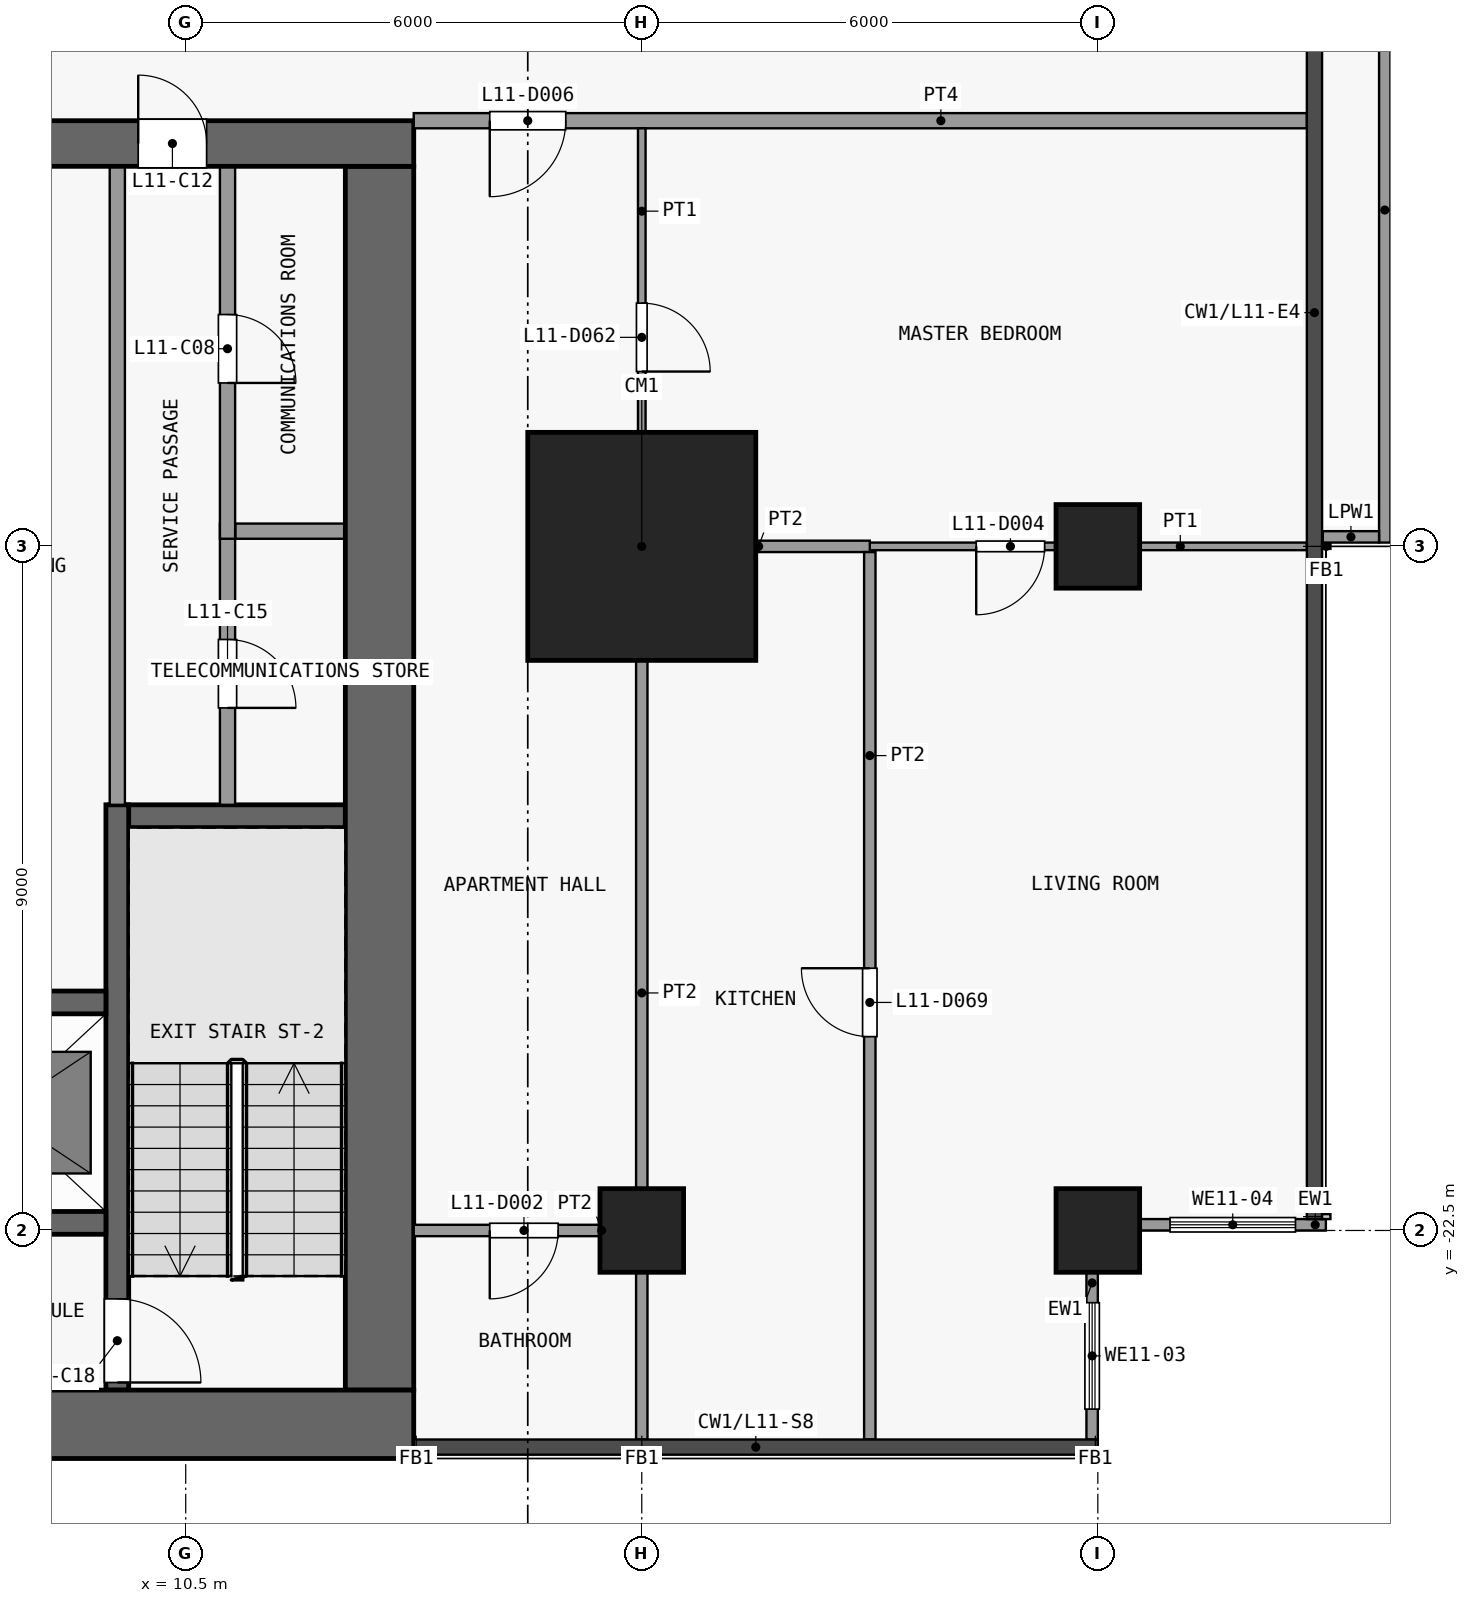
"""IFC4 building model, lengths in metres.
Left out: names, types, materials, properties, quantities, classifications, styles, units other than length and angle.
Written with IfcOpenShell. Run it as: python <this file> out.ifc"""

import sys

from ifc_helpers import new_model, si_unit, direction, frame, frame_2d, origin, origin_2d, place, context, subcontext, project, spatial, rectangle, extrude, element, fill, save


model = new_model("IFC4")
c1 = context("Model", 3, precision=1e-05, world=origin(), true_north=direction((0.0, 1.0)))
c2 = subcontext(c1, "Body", "Model", "MODEL_VIEW")
j1 = project(units=[si_unit("LENGTHUNIT", "METRE"), si_unit("PLANEANGLEUNIT", "RADIAN")], contexts=[c1])
p1 = place(None, origin())
s1 = spatial("IfcSite", under=j1, at=p1, CompositionType="ELEMENT")
p2 = place(p1, origin())
s2 = spatial("IfcBuilding", under=s1, at=p2, CompositionType="ELEMENT")
p3 = place(p2, frame((0.0, 0.0, 50.5)))
s3 = spatial("IfcBuildingStorey", under=s2, at=p3, CompositionType="ELEMENT", Elevation=50.5)
p4 = place(p3, frame((16.5, -22.5, 0.0), z_axis=(0.0, 0.0, 1.0), x_axis=(1.0, 0.0, 0.0)))
e1 = element("IfcColumn", 1, at=p4, inside=s3, PredefinedType="COLUMN", context=c2, shape_type="SweptSolid", body=[
    extrude(rectangle(XDim=1.1, YDim=1.1, at=origin_2d()), origin(), (0.0, 0.0, 1.0), 3.6),
])
p5 = place(p3, frame((16.5, -13.5, 0.0), z_axis=(0.0, 0.0, 1.0), x_axis=(1.0, 0.0, 0.0)))
e2 = element("IfcColumn", 2, at=p5, inside=s3, PredefinedType="COLUMN", context=c2, shape_type="SweptSolid", body=[
    extrude(rectangle(XDim=3.0, YDim=3.0, at=origin_2d()), origin(), (0.0, 0.0, 1.0), 3.6),
])
for number, where, z_axis, x_axis in (
    (3, (22.5, -22.5, 0.0), (0.0, 0.0, 1.0), (1.0, 0.0, 0.0)),
    (4, (22.5, -13.5, 0.0), (0.0, 0.0, 1.0), (1.0, 0.0, 0.0)),
):
    element("IfcColumn", number, at=place(p3, frame(where, z_axis=z_axis, x_axis=x_axis)), inside=s3, PredefinedType="COLUMN", context=c2, shape_type="SweptSolid", body=[
        extrude(rectangle(XDim=1.1, YDim=1.1, at=origin_2d()), origin(), (0.0, 0.0, 1.0), 3.6),
    ])
p6 = place(p3, frame((-13.5, -25.05, 0.0), z_axis=(0.0, 0.0, 1.0), x_axis=(1.0, 0.0, 0.0)))
e5 = element("IfcWall", 5, at=p6, inside=s3, PredefinedType="SHEAR", context=c2, shape_type="SweptSolid", body=[
    extrude(rectangle(XDim=27.0, YDim=0.9, at=frame_2d((13.5, 0.0))), origin(), (0.0, 0.0, 1.0), 3.3),
])
p7 = place(p3, frame((-13.5, -8.2, 0.0), z_axis=(0.0, 0.0, 1.0), x_axis=(1.0, 0.0, 0.0)))
e6 = element("IfcWall", 6, at=p7, inside=s3, PredefinedType="SHEAR", context=c2, shape_type="SweptSolid", body=[
    extrude(rectangle(XDim=27.0, YDim=0.6, at=frame_2d((13.5, 0.0))), origin(), (0.0, 0.0, 1.0), 3.3),
])
p8 = place(p7, frame((7.8, 0.0, 0.0)))
e7 = element("IfcOpeningElement", 7, at=p8, cuts=e6, PredefinedType="OPENING", context=c2, shape_type="SweptSolid", body=[
    extrude(rectangle(XDim=1.8, YDim=2.1, at=frame_2d((0.9, 1.05))), frame((0.0, 0.31, 0.0), z_axis=(0.0, -1.0, 0.0), x_axis=(1.0, 0.0, 0.0)), (0.0, 0.0, 1.0), 0.62),
])
p9 = place(p7, frame((17.4, 0.0, 0.0)))
e8 = element("IfcOpeningElement", 8, at=p9, cuts=e6, PredefinedType="OPENING", context=c2, shape_type="SweptSolid", body=[
    extrude(rectangle(XDim=1.8, YDim=2.1, at=frame_2d((0.9, 1.05))), frame((0.0, 0.31, 0.0), z_axis=(0.0, -1.0, 0.0), x_axis=(1.0, 0.0, 0.0)), (0.0, 0.0, 1.0), 0.62),
])
p10 = place(p7, frame((2.725, 0.0, 0.0)))
e9 = element("IfcOpeningElement", 9, at=p10, cuts=e6, PredefinedType="OPENING", context=c2, shape_type="SweptSolid", body=[
    extrude(rectangle(XDim=0.9, YDim=2.1, at=frame_2d((0.45, 1.05))), frame((0.0, 0.31, 0.0), z_axis=(0.0, -1.0, 0.0), x_axis=(1.0, 0.0, 0.0)), (0.0, 0.0, 1.0), 0.62),
])
p11 = place(p7, frame((23.375, 0.0, 0.0)))
e10 = element("IfcOpeningElement", 10, at=p11, cuts=e6, PredefinedType="OPENING", context=c2, shape_type="SweptSolid", body=[
    extrude(rectangle(XDim=0.9, YDim=2.1, at=frame_2d((0.45, 1.05))), frame((0.0, 0.31, 0.0), z_axis=(0.0, -1.0, 0.0), x_axis=(1.0, 0.0, 0.0)), (0.0, 0.0, 1.0), 0.62),
])
p12 = place(p3, frame((13.05, -24.6, 0.0), z_axis=(0.0, 0.0, 1.0), x_axis=(0.0, 1.0, 0.0)))
e11 = element("IfcWall", 11, at=p12, inside=s3, PredefinedType="SHEAR", context=c2, shape_type="SweptSolid", body=[
    extrude(rectangle(XDim=16.1, YDim=0.9, at=frame_2d((8.05, 0.0))), origin(), (0.0, 0.0, 1.0), 3.3),
])
p13 = place(p3, frame((6.35, -22.4, 0.0), z_axis=(0.0, 0.0, 1.0), x_axis=(1.0, 0.0, 0.0)))
e12 = element("IfcWall", 12, at=p13, inside=s3, PredefinedType="SHEAR", context=c2, shape_type="SweptSolid", body=[
    extrude(rectangle(XDim=3.1, YDim=0.3, at=frame_2d((1.55, 0.0))), origin(), (0.0, 0.0, 1.0), 3.3),
])
p14 = place(p3, frame((6.425, -19.5, 0.0), z_axis=(0.0, 0.0, 1.0), x_axis=(1.0, 0.0, 0.0)))
e13 = element("IfcWall", 13, at=p14, inside=s3, PredefinedType="SHEAR", context=c2, shape_type="SweptSolid", body=[
    extrude(rectangle(XDim=3.025, YDim=0.3, at=frame_2d((1.512, 0.0))), origin(), (0.0, 0.0, 1.0), 3.3),
])
p15 = place(p3, frame((9.5, -17.05, 0.0), z_axis=(0.0, 0.0, 1.0), x_axis=(1.0, 0.0, 0.0)))
e14 = element("IfcWall", 14, at=p15, inside=s3, PredefinedType="SHEAR", context=c2, shape_type="SweptSolid", body=[
    extrude(rectangle(XDim=3.1, YDim=0.3, at=frame_2d((1.55, 0.0))), origin(), (0.0, 0.0, 1.0), 3.3),
])
p16 = place(p3, frame((11.15, -13.3, 0.0), z_axis=(0.0, 0.0, 1.0), x_axis=(1.0, 0.0, 0.0)))
e15 = element("IfcWall", 15, at=p16, inside=s3, PredefinedType="PARTITIONING", context=c2, shape_type="SweptSolid", body=[
    extrude(rectangle(XDim=1.45, YDim=0.2, at=frame_2d((0.725, 0.0))), origin(), (0.0, 0.0, 1.0), 3.3),
])
p17 = place(p3, frame((9.6, -16.9, 0.0), z_axis=(0.0, 0.0, 1.0), x_axis=(0.0, -1.0, 0.0)))
e16 = element("IfcWall", 16, at=p17, inside=s3, PredefinedType="SHEAR", context=c2, shape_type="SweptSolid", body=[
    extrude(rectangle(XDim=7.7, YDim=0.3, at=frame_2d((3.85, 0.0))), origin(), (0.0, 0.0, 1.0), 3.3),
])
p18 = place(p17, frame((6.5, 0.0, 0.0)))
e17 = element("IfcOpeningElement", 17, at=p18, cuts=e16, PredefinedType="OPENING", context=c2, shape_type="SweptSolid", body=[
    extrude(rectangle(XDim=1.1, YDim=2.1, at=frame_2d((0.55, 1.05))), frame((0.0, 0.16, 0.0), z_axis=(0.0, -1.0, 0.0), x_axis=(1.0, 0.0, 0.0)), (0.0, 0.0, 1.0), 0.32),
])
p19 = place(p3, frame((9.6, -16.9, 0.0), z_axis=(0.0, 0.0, 1.0), x_axis=(0.0, 1.0, 0.0)))
e18 = element("IfcWall", 18, at=p19, inside=s3, PredefinedType="PARTITIONING", context=c2, shape_type="SweptSolid", body=[
    extrude(rectangle(XDim=8.4, YDim=0.2, at=frame_2d((4.2, 0.0))), origin(), (0.0, 0.0, 1.0), 3.3),
])
p20 = place(p3, frame((11.05, -13.2, 0.0), z_axis=(0.0, 0.0, 1.0), x_axis=(0.0, -1.0, 0.0)))
e19 = element("IfcWall", 19, at=p20, inside=s3, PredefinedType="PARTITIONING", context=c2, shape_type="SweptSolid", body=[
    extrude(rectangle(XDim=3.7, YDim=0.2, at=frame_2d((1.85, 0.0))), origin(), (0.0, 0.0, 1.0), 3.3),
])
p21 = place(p20, frame((1.525, 0.0, 0.0)))
e20 = element("IfcOpeningElement", 20, at=p21, cuts=e19, PredefinedType="OPENING", context=c2, shape_type="SweptSolid", body=[
    extrude(rectangle(XDim=0.9, YDim=2.1, at=frame_2d((0.45, 1.05))), frame((0.0, 0.11, 0.0), z_axis=(0.0, -1.0, 0.0), x_axis=(1.0, 0.0, 0.0)), (0.0, 0.0, 1.0), 0.22),
])
p22 = place(p3, frame((11.05, -8.5, 0.0), z_axis=(0.0, 0.0, 1.0), x_axis=(0.0, -1.0, 0.0)))
e21 = element("IfcWall", 21, at=p22, inside=s3, PredefinedType="PARTITIONING", context=c2, shape_type="SweptSolid", body=[
    extrude(rectangle(XDim=4.9, YDim=0.2, at=frame_2d((2.45, 0.0))), origin(), (0.0, 0.0, 1.0), 3.3),
])
p23 = place(p22, frame((1.95, 0.0, 0.0)))
e22 = element("IfcOpeningElement", 22, at=p23, cuts=e21, PredefinedType="OPENING", context=c2, shape_type="SweptSolid", body=[
    extrude(rectangle(XDim=0.9, YDim=2.1, at=frame_2d((0.45, 1.05))), frame((0.0, 0.11, 0.0), z_axis=(0.0, -1.0, 0.0), x_axis=(1.0, 0.0, 0.0)), (0.0, 0.0, 1.0), 0.22),
])
p24 = place(p3, frame((22.425, -23.05, 0.0), z_axis=(0.0, 0.0, 1.0), x_axis=(0.0, -1.0, 0.0)))
e23 = element("IfcWall", 23, at=p24, inside=s3, PredefinedType="SOLIDWALL", context=c2, shape_type="SweptSolid", body=[
    extrude(rectangle(XDim=2.2, YDim=0.15, at=frame_2d((1.1, 0.0))), origin(), (0.0, 0.0, 1.0), 3.3),
])
p25 = place(p24, frame((0.4, 0.0, 0.9)))
e24 = element("IfcOpeningElement", 24, at=p25, cuts=e23, PredefinedType="OPENING", context=c2, shape_type="SweptSolid", body=[
    extrude(rectangle(XDim=1.4, YDim=2.4, at=frame_2d((0.7, 1.2))), frame((0.0, 0.085, 0.0), z_axis=(0.0, -1.0, 0.0), x_axis=(1.0, 0.0, 0.0)), (0.0, 0.0, 1.0), 0.17),
])
p26 = place(p3, frame((25.5, -22.425, 0.0), z_axis=(0.0, 0.0, 1.0), x_axis=(-1.0, 0.0, 0.0)))
e25 = element("IfcWall", 25, at=p26, inside=s3, PredefinedType="SOLIDWALL", context=c2, shape_type="SweptSolid", body=[
    extrude(rectangle(XDim=2.45, YDim=0.15, at=frame_2d((1.225, 0.0))), origin(), (0.0, 0.0, 1.0), 3.3),
])
p27 = place(p26, frame((0.4, 0.0, 0.9)))
e26 = element("IfcOpeningElement", 26, at=p27, cuts=e25, PredefinedType="OPENING", context=c2, shape_type="SweptSolid", body=[
    extrude(rectangle(XDim=1.65, YDim=2.4, at=frame_2d((0.825, 1.2))), frame((0.0, 0.085, 0.0), z_axis=(0.0, -1.0, 0.0), x_axis=(1.0, 0.0, 0.0)), (0.0, 0.0, 1.0), 0.17),
])
p28 = place(p3, frame((26.275, -4.7, 0.0), z_axis=(0.0, 0.0, 1.0), x_axis=(0.0, -1.0, 0.0)))
e27 = element("IfcWall", 27, at=p28, inside=s3, PredefinedType="PARAPET", context=c2, shape_type="SweptSolid", body=[
    extrude(rectangle(XDim=8.75, YDim=0.15, at=frame_2d((4.375, 0.0))), origin(), (0.0, 0.0, 1.0), 1.15),
])
p29 = place(p3, frame((26.2, -13.375, 0.0), z_axis=(0.0, 0.0, 1.0), x_axis=(-1.0, 0.0, 0.0)))
e28 = element("IfcWall", 28, at=p29, inside=s3, PredefinedType="PARAPET", context=c2, shape_type="SweptSolid", body=[
    extrude(rectangle(XDim=0.74, YDim=0.15, at=frame_2d((0.37, 0.0))), origin(), (0.0, 0.0, 1.0), 1.15),
])
p30 = place(p3, frame((13.5, -22.5, 0.0), z_axis=(0.0, 0.0, 1.0), x_axis=(1.0, 0.0, 0.0)))
e29 = element("IfcWall", 29, at=p30, inside=s3, PredefinedType="PARTITIONING", context=c2, shape_type="SweptSolid", body=[
    extrude(rectangle(XDim=2.925, YDim=0.15, at=frame_2d((1.462, 0.0))), origin(), (0.0, 0.0, 1.0), 3.3),
])
p31 = place(p30, frame((1.0, 0.0, 0.0)))
e30 = element("IfcOpeningElement", 30, at=p31, cuts=e29, PredefinedType="OPENING", context=c2, shape_type="SweptSolid", body=[
    extrude(rectangle(XDim=0.9, YDim=2.1, at=frame_2d((0.45, 1.05))), frame((0.0, 0.085, 0.0), z_axis=(0.0, -1.0, 0.0), x_axis=(1.0, 0.0, 0.0)), (0.0, 0.0, 1.0), 0.17),
])
p32 = place(p3, frame((19.5, -13.5, 0.0), z_axis=(0.0, 0.0, 1.0), x_axis=(1.0, 0.0, 0.0)))
e31 = element("IfcWall", 31, at=p32, inside=s3, PredefinedType="PARTITIONING", context=c2, shape_type="SweptSolid", body=[
    extrude(rectangle(XDim=5.75, YDim=0.1, at=frame_2d((2.875, 0.0))), origin(), (0.0, 0.0, 1.0), 3.3),
])
p33 = place(p32, frame((1.4, 0.0, 0.0)))
e32 = element("IfcOpeningElement", 32, at=p33, cuts=e31, PredefinedType="OPENING", context=c2, shape_type="SweptSolid", body=[
    extrude(rectangle(XDim=0.9, YDim=2.1, at=frame_2d((0.45, 1.05))), frame((0.0, 0.06, 0.0), z_axis=(0.0, -1.0, 0.0), x_axis=(1.0, 0.0, 0.0)), (0.0, 0.0, 1.0), 0.12),
])
p34 = place(p3, frame((16.575, -13.5, 0.0), z_axis=(0.0, 0.0, 1.0), x_axis=(1.0, 0.0, 0.0)))
e33 = element("IfcWall", 33, at=p34, inside=s3, PredefinedType="PARTITIONING", context=c2, shape_type="SweptSolid", body=[
    extrude(rectangle(XDim=2.925, YDim=0.15, at=frame_2d((1.462, 0.0))), origin(), (0.0, 0.0, 1.0), 3.3),
])
p35 = place(p3, frame((13.5, -7.9, 0.0), z_axis=(0.0, 0.0, 1.0), x_axis=(1.0, 0.0, 0.0)))
e34 = element("IfcWall", 34, at=p35, inside=s3, PredefinedType="PARTITIONING", context=c2, shape_type="SweptSolid", body=[
    extrude(rectangle(XDim=11.75, YDim=0.2, at=frame_2d((5.875, 0.0))), origin(), (0.0, 0.0, 1.0), 3.3),
])
p36 = place(p35, frame((1.0, 0.0, 0.0)))
e35 = element("IfcOpeningElement", 35, at=p36, cuts=e34, PredefinedType="OPENING", context=c2, shape_type="SweptSolid", body=[
    extrude(rectangle(XDim=1.0, YDim=2.1, at=frame_2d((0.5, 1.05))), frame((0.0, 0.11, 0.0), z_axis=(0.0, -1.0, 0.0), x_axis=(1.0, 0.0, 0.0)), (0.0, 0.0, 1.0), 0.22),
])
p37 = place(p3, frame((16.5, -13.5, 0.0), z_axis=(0.0, 0.0, 1.0), x_axis=(0.0, 1.0, 0.0)))
e36 = element("IfcWall", 36, at=p37, inside=s3, PredefinedType="PARTITIONING", context=c2, shape_type="SweptSolid", body=[
    extrude(rectangle(XDim=5.5, YDim=0.1, at=frame_2d((2.75, 0.0))), origin(), (0.0, 0.0, 1.0), 3.3),
])
p38 = place(p37, frame((2.3, 0.0, 0.0)))
e37 = element("IfcOpeningElement", 37, at=p38, cuts=e36, PredefinedType="OPENING", context=c2, shape_type="SweptSolid", body=[
    extrude(rectangle(XDim=0.9, YDim=2.1, at=frame_2d((0.45, 1.05))), frame((0.0, 0.06, 0.0), z_axis=(0.0, -1.0, 0.0), x_axis=(1.0, 0.0, 0.0)), (0.0, 0.0, 1.0), 0.12),
])
p39 = place(p3, frame((16.5, -25.25, 0.0), z_axis=(0.0, 0.0, 1.0), x_axis=(0.0, 1.0, 0.0)))
e38 = element("IfcWall", 38, at=p39, inside=s3, PredefinedType="PARTITIONING", context=c2, shape_type="SweptSolid", body=[
    extrude(rectangle(XDim=11.75, YDim=0.15, at=frame_2d((5.875, 0.0))), origin(), (0.0, 0.0, 1.0), 3.3),
])
p40 = place(p3, frame((19.5, -25.25, 0.0), z_axis=(0.0, 0.0, 1.0), x_axis=(0.0, 1.0, 0.0)))
e39 = element("IfcWall", 39, at=p40, inside=s3, PredefinedType="PARTITIONING", context=c2, shape_type="SweptSolid", body=[
    extrude(rectangle(XDim=11.675, YDim=0.15, at=frame_2d((5.837, 0.0))), origin(), (0.0, 0.0, 1.0), 3.3),
])
p41 = place(p40, frame((5.3, 0.0, 0.0)))
e40 = element("IfcOpeningElement", 40, at=p41, cuts=e39, PredefinedType="OPENING", context=c2, shape_type="SweptSolid", body=[
    extrude(rectangle(XDim=0.9, YDim=2.1, at=frame_2d((0.45, 1.05))), frame((0.0, 0.085, 0.0), z_axis=(0.0, -1.0, 0.0), x_axis=(1.0, 0.0, 0.0)), (0.0, 0.0, 1.0), 0.17),
])
p42 = place(p23, origin())
e41 = element("IfcDoor", 41, at=p42, inside=s3, OperationType="SINGLE_SWING_RIGHT", PredefinedType="DOOR", context=c2, shape_type="SweptSolid", body=[
    extrude(rectangle(XDim=0.9, YDim=2.1, at=frame_2d((0.45, 1.05))), frame((0.0, 0.025, 0.0), z_axis=(0.0, -1.0, 0.0), x_axis=(1.0, 0.0, 0.0)), (0.0, 0.0, 1.0), 0.05),
])
fill(e22, e41)
p43 = place(p11, origin())
e42 = element("IfcDoor", 42, at=p43, inside=s3, OperationType="SINGLE_SWING_LEFT", PredefinedType="DOOR", context=c2, shape_type="SweptSolid", body=[
    extrude(rectangle(XDim=0.9, YDim=2.1, at=frame_2d((0.45, 1.05))), frame((0.0, 0.025, 0.0), z_axis=(0.0, -1.0, 0.0), x_axis=(1.0, 0.0, 0.0)), (0.0, 0.0, 1.0), 0.05),
])
fill(e10, e42)
p44 = place(p21, origin())
e43 = element("IfcDoor", 43, at=p44, inside=s3, OperationType="SINGLE_SWING_RIGHT", PredefinedType="DOOR", context=c2, shape_type="SweptSolid", body=[
    extrude(rectangle(XDim=0.9, YDim=2.1, at=frame_2d((0.45, 1.05))), frame((0.0, 0.025, 0.0), z_axis=(0.0, -1.0, 0.0), x_axis=(1.0, 0.0, 0.0)), (0.0, 0.0, 1.0), 0.05),
])
fill(e20, e43)
p45 = place(p18, origin())
e44 = element("IfcDoor", 44, at=p45, inside=s3, OperationType="SINGLE_SWING_RIGHT", PredefinedType="DOOR", context=c2, shape_type="SweptSolid", body=[
    extrude(rectangle(XDim=1.1, YDim=2.1, at=frame_2d((0.55, 1.05))), frame((0.0, 0.025, 0.0), z_axis=(0.0, -1.0, 0.0), x_axis=(1.0, 0.0, 0.0)), (0.0, 0.0, 1.0), 0.05),
])
fill(e17, e44)
p46 = place(p25, origin())
e45 = element("IfcWindow", 45, at=p46, inside=s3, PartitioningType="SINGLE_PANEL", PredefinedType="WINDOW", context=c2, shape_type="SweptSolid", body=[
    extrude(rectangle(XDim=1.4, YDim=2.4, at=frame_2d((0.7, 1.2))), frame((0.0, 0.03, 0.0), z_axis=(0.0, -1.0, 0.0), x_axis=(1.0, 0.0, 0.0)), (0.0, 0.0, 1.0), 0.06),
])
fill(e24, e45)
p47 = place(p27, origin())
e46 = element("IfcWindow", 46, at=p47, inside=s3, PartitioningType="SINGLE_PANEL", PredefinedType="WINDOW", context=c2, shape_type="SweptSolid", body=[
    extrude(rectangle(XDim=1.65, YDim=2.4, at=frame_2d((0.825, 1.2))), frame((0.0, 0.03, 0.0), z_axis=(0.0, -1.0, 0.0), x_axis=(1.0, 0.0, 0.0)), (0.0, 0.0, 1.0), 0.06),
])
fill(e26, e46)
p48 = place(p31, origin())
e47 = element("IfcDoor", 47, at=p48, inside=s3, OperationType="SINGLE_SWING_LEFT", PredefinedType="DOOR", context=c2, shape_type="SweptSolid", body=[
    extrude(rectangle(XDim=0.9, YDim=2.1, at=frame_2d((0.45, 1.05))), frame((0.0, 0.025, 0.0), z_axis=(0.0, -1.0, 0.0), x_axis=(1.0, 0.0, 0.0)), (0.0, 0.0, 1.0), 0.05),
])
fill(e30, e47)
p49 = place(p33, origin())
e48 = element("IfcDoor", 48, at=p49, inside=s3, OperationType="SINGLE_SWING_LEFT", PredefinedType="DOOR", context=c2, shape_type="SweptSolid", body=[
    extrude(rectangle(XDim=0.9, YDim=2.1, at=frame_2d((0.45, 1.05))), frame((0.0, 0.025, 0.0), z_axis=(0.0, -1.0, 0.0), x_axis=(1.0, 0.0, 0.0)), (0.0, 0.0, 1.0), 0.05),
])
fill(e32, e48)
p50 = place(p36, origin())
e49 = element("IfcDoor", 49, at=p50, inside=s3, OperationType="SINGLE_SWING_LEFT", PredefinedType="DOOR", context=c2, shape_type="SweptSolid", body=[
    extrude(rectangle(XDim=1.0, YDim=2.1, at=frame_2d((0.5, 1.05))), frame((0.0, 0.025, 0.0), z_axis=(0.0, -1.0, 0.0), x_axis=(1.0, 0.0, 0.0)), (0.0, 0.0, 1.0), 0.05),
])
fill(e35, e49)
p51 = place(p38, origin())
e50 = element("IfcDoor", 50, at=p51, inside=s3, OperationType="SINGLE_SWING_LEFT", PredefinedType="DOOR", context=c2, shape_type="SweptSolid", body=[
    extrude(rectangle(XDim=0.9, YDim=2.1, at=frame_2d((0.45, 1.05))), frame((0.0, 0.025, 0.0), z_axis=(0.0, -1.0, 0.0), x_axis=(1.0, 0.0, 0.0)), (0.0, 0.0, 1.0), 0.05),
])
fill(e37, e50)
p52 = place(p41, origin())
e51 = element("IfcDoor", 51, at=p52, inside=s3, OperationType="SINGLE_SWING_LEFT", PredefinedType="DOOR", context=c2, shape_type="SweptSolid", body=[
    extrude(rectangle(XDim=0.9, YDim=2.1, at=frame_2d((0.45, 1.05))), frame((0.0, 0.025, 0.0), z_axis=(0.0, -1.0, 0.0), x_axis=(1.0, 0.0, 0.0)), (0.0, 0.0, 1.0), 0.05),
])
fill(e40, e51)
save(model, sys.argv[1])
